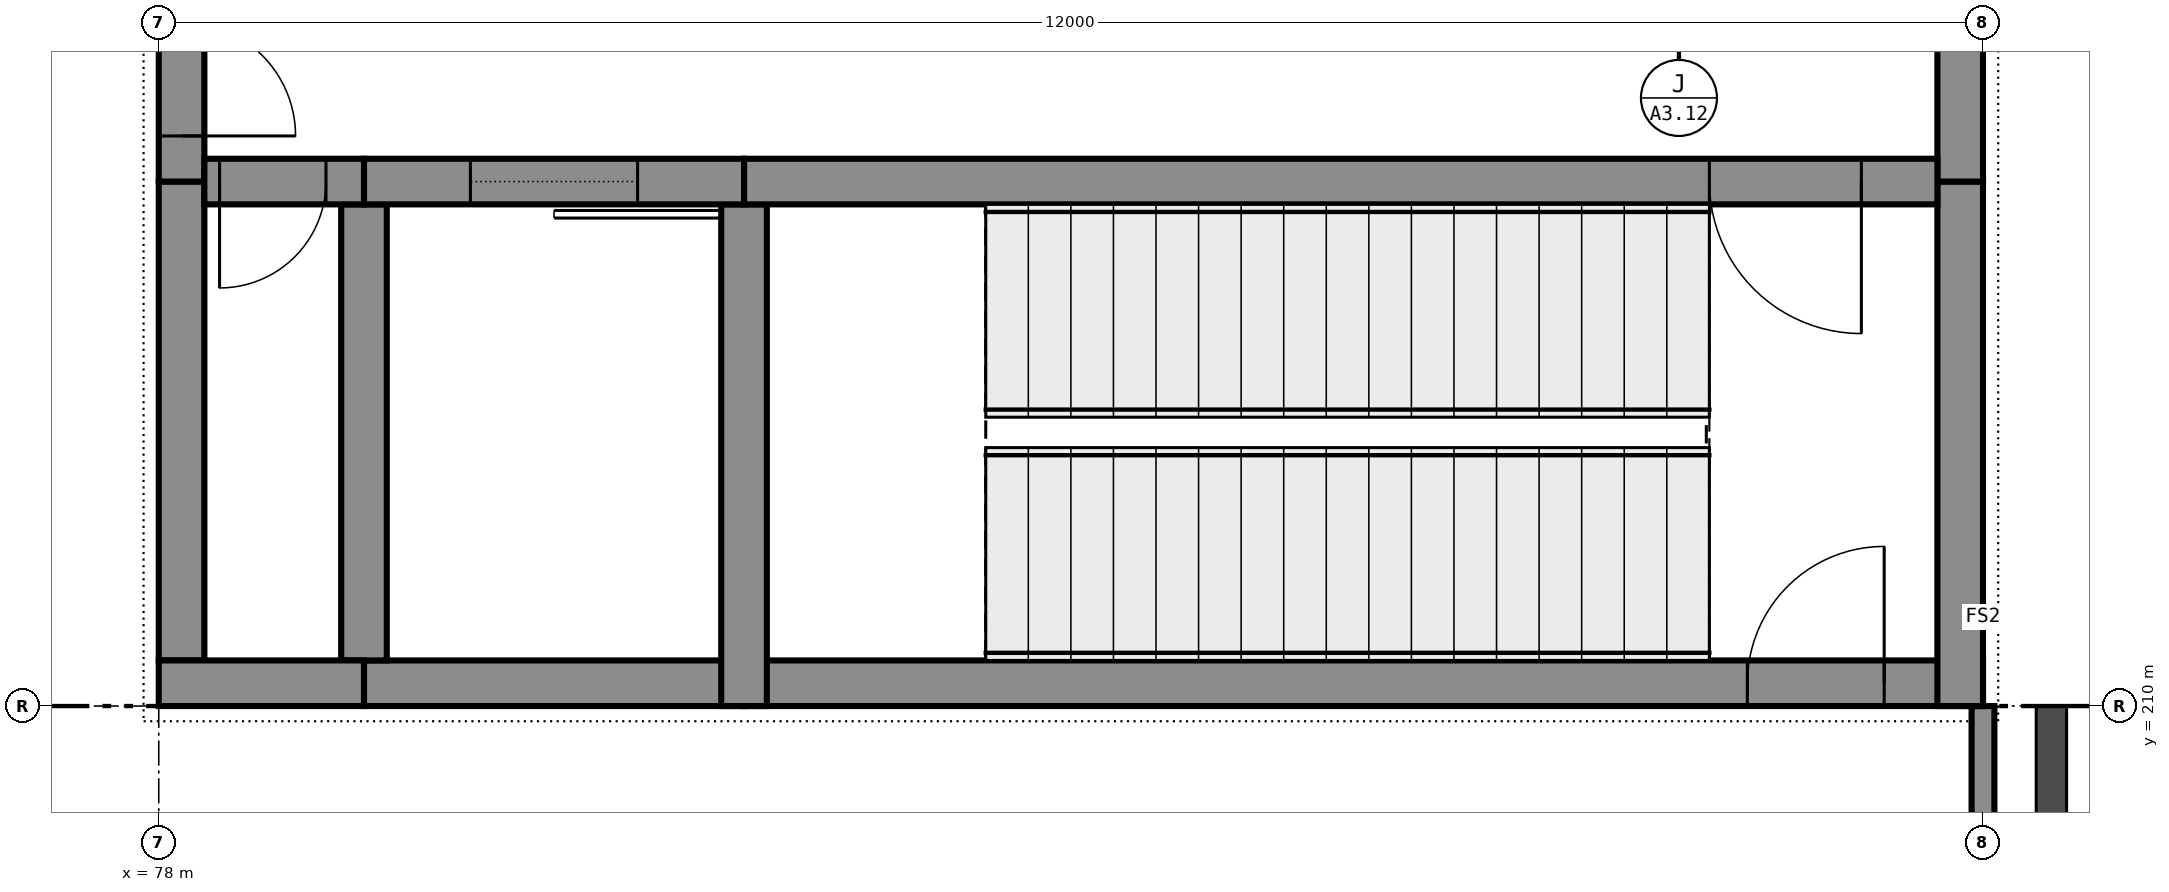
"""IFC4 building model, lengths in metres.
Left out: names, types, materials, properties, quantities, classifications, styles, units other than length and angle.
Written with IfcOpenShell. Run it as: python <this file> out.ifc"""

import sys

from ifc_helpers import new_model, si_unit, direction, frame, frame_2d, origin, place, context, subcontext, project, spatial, rectangle, extrude, element, fill, save


model = new_model("IFC4")
c1 = context("Model", 3, precision=1e-05, world=origin(), true_north=direction((0.0, 1.0)))
c2 = subcontext(c1, "Body", "Model", "MODEL_VIEW")
j1 = project(units=[si_unit("LENGTHUNIT", "METRE"), si_unit("PLANEANGLEUNIT", "RADIAN")], contexts=[c1])
p1 = place(None, origin())
s1 = spatial("IfcSite", under=j1, at=p1, CompositionType="ELEMENT")
p2 = place(p1, origin())
s2 = spatial("IfcBuilding", under=s1, at=p2, CompositionType="ELEMENT")
p3 = place(p2, frame((0.0, 0.0, 6.0)))
s3 = spatial("IfcBuildingStorey", under=s2, at=p3, CompositionType="ELEMENT", Elevation=6.0)
p4 = place(p3, frame((90.0, 210.15, 0.0), z_axis=(0.0, 0.0, 1.0), x_axis=(-1.0, 0.0, 0.0)))
e1 = element("IfcWall", 1, at=p4, inside=s3, PredefinedType="SHEAR", context=c2, shape_type="SweptSolid", body=[
    extrude(rectangle(XDim=8.15, YDim=0.3, at=frame_2d((4.075, 0.0))), origin(), (0.0, 0.0, 1.0), 5.75),
])
p5 = place(p4, frame((0.65, 0.0, 0.0)))
e2 = element("IfcOpeningElement", 2, at=p5, cuts=e1, PredefinedType="OPENING", context=c2, shape_type="SweptSolid", body=[
    extrude(rectangle(XDim=0.9, YDim=2.1, at=frame_2d((0.45, 1.05))), frame((0.0, 0.16, 0.0), z_axis=(0.0, -1.0, 0.0), x_axis=(1.0, 0.0, 0.0)), (0.0, 0.0, 1.0), 0.32),
])
p6 = place(p3, frame((81.85, 210.15, 0.0), z_axis=(0.0, 0.0, 1.0), x_axis=(-1.0, 0.0, 0.0)))
e3 = element("IfcWall", 3, at=p6, inside=s3, PredefinedType="SHEAR", context=c2, shape_type="SweptSolid", body=[
    extrude(rectangle(XDim=2.5, YDim=0.3, at=frame_2d((1.25, 0.0))), origin(), (0.0, 0.0, 1.0), 5.75),
])
p7 = place(p3, frame((79.35, 210.15, 0.0), z_axis=(0.0, 0.0, 1.0), x_axis=(-1.0, 0.0, 0.0)))
e4 = element("IfcWall", 4, at=p7, inside=s3, PredefinedType="SHEAR", context=c2, shape_type="SweptSolid", body=[
    extrude(rectangle(XDim=1.35, YDim=0.3, at=frame_2d((0.675, 0.0))), origin(), (0.0, 0.0, 1.0), 5.75),
])
p8 = place(p3, frame((89.7, 213.45, 0.0), z_axis=(0.0, 0.0, 1.0), x_axis=(-1.0, 0.0, 0.0)))
e5 = element("IfcWall", 5, at=p8, inside=s3, PredefinedType="SHEAR", context=c2, shape_type="SweptSolid", body=[
    extrude(rectangle(XDim=7.85, YDim=0.3, at=frame_2d((3.925, 0.0))), origin(), (0.0, 0.0, 1.0), 5.75),
])
p9 = place(p8, frame((0.5, 0.0, 0.0)))
e6 = element("IfcOpeningElement", 6, at=p9, cuts=e5, PredefinedType="OPENING", context=c2, shape_type="SweptSolid", body=[
    extrude(rectangle(XDim=1.0, YDim=2.1, at=frame_2d((0.5, 1.05))), frame((0.0, 0.16, 0.0), z_axis=(0.0, -1.0, 0.0), x_axis=(1.0, 0.0, 0.0)), (0.0, 0.0, 1.0), 0.32),
])
p10 = place(p3, frame((81.85, 213.45, 0.0), z_axis=(0.0, 0.0, 1.0), x_axis=(-1.0, 0.0, 0.0)))
e7 = element("IfcWall", 7, at=p10, inside=s3, PredefinedType="SHEAR", context=c2, shape_type="SweptSolid", body=[
    extrude(rectangle(XDim=2.5, YDim=0.3, at=frame_2d((1.25, 0.0))), origin(), (0.0, 0.0, 1.0), 5.75),
])
p11 = place(p10, frame((0.7, 0.0, 0.0)))
e8 = element("IfcOpeningElement", 8, at=p11, cuts=e7, PredefinedType="OPENING", context=c2, shape_type="SweptSolid", body=[
    extrude(rectangle(XDim=1.1, YDim=2.1, at=frame_2d((0.55, 1.05))), frame((0.0, 0.16, 0.0), z_axis=(0.0, -1.0, 0.0), x_axis=(1.0, 0.0, 0.0)), (0.0, 0.0, 1.0), 0.32),
])
p12 = place(p3, frame((79.35, 213.45, 0.0), z_axis=(0.0, 0.0, 1.0), x_axis=(-1.0, 0.0, 0.0)))
e9 = element("IfcWall", 9, at=p12, inside=s3, PredefinedType="SHEAR", context=c2, shape_type="SweptSolid", body=[
    extrude(rectangle(XDim=1.05, YDim=0.3, at=frame_2d((0.525, 0.0))), origin(), (0.0, 0.0, 1.0), 5.75),
])
p13 = place(p12, frame((0.25, 0.0, 0.0)))
e10 = element("IfcOpeningElement", 10, at=p13, cuts=e9, PredefinedType="OPENING", context=c2, shape_type="SweptSolid", body=[
    extrude(rectangle(XDim=0.7, YDim=2.1, at=frame_2d((0.35, 1.05))), frame((0.0, 0.16, 0.0), z_axis=(0.0, -1.0, 0.0), x_axis=(1.0, 0.0, 0.0)), (0.0, 0.0, 1.0), 0.32),
])
p14 = place(p3, frame((89.85, 210.0, 0.0), z_axis=(0.0, 0.0, 1.0), x_axis=(0.0, 1.0, 0.0)))
e11 = element("IfcWall", 11, at=p14, inside=s3, PredefinedType="SHEAR", context=c2, shape_type="SweptSolid", body=[
    extrude(rectangle(XDim=3.45, YDim=0.3, at=frame_2d((1.725, 0.0))), origin(), (0.0, 0.0, 1.0), 5.75),
])
p15 = place(p3, frame((89.85, 213.45, 0.0), z_axis=(0.0, 0.0, 1.0), x_axis=(0.0, 1.0, 0.0)))
e12 = element("IfcWall", 12, at=p15, inside=s3, PredefinedType="SHEAR", context=c2, shape_type="SweptSolid", body=[
    extrude(rectangle(XDim=5.1, YDim=0.3, at=frame_2d((2.55, 0.0))), origin(), (0.0, 0.0, 1.0), 5.75),
])
p16 = place(p3, frame((78.15, 210.3, 0.0), z_axis=(0.0, 0.0, 1.0), x_axis=(0.0, 1.0, 0.0)))
e13 = element("IfcWall", 13, at=p16, inside=s3, PredefinedType="SHEAR", context=c2, shape_type="SweptSolid", body=[
    extrude(rectangle(XDim=3.15, YDim=0.3, at=frame_2d((1.575, 0.0))), origin(), (0.0, 0.0, 1.0), 5.75),
])
p17 = place(p3, frame((78.15, 213.45, 0.0), z_axis=(0.0, 0.0, 1.0), x_axis=(0.0, 1.0, 0.0)))
e14 = element("IfcWall", 14, at=p17, inside=s3, PredefinedType="SHEAR", context=c2, shape_type="SweptSolid", body=[
    extrude(rectangle(XDim=5.1, YDim=0.3, at=frame_2d((2.55, 0.0))), origin(), (0.0, 0.0, 1.0), 5.75),
])
p18 = place(p17, frame((0.3, 0.0, 0.0)))
e15 = element("IfcOpeningElement", 15, at=p18, cuts=e14, PredefinedType="OPENING", context=c2, shape_type="SweptSolid", body=[
    extrude(rectangle(XDim=1.5, YDim=2.1, at=frame_2d((0.75, 1.05))), frame((0.0, 0.16, 0.0), z_axis=(0.0, -1.0, 0.0), x_axis=(1.0, 0.0, 0.0)), (0.0, 0.0, 1.0), 0.32),
])
p19 = place(p3, frame((81.85, 210.0, 0.0), z_axis=(0.0, 0.0, 1.0), x_axis=(0.0, 1.0, 0.0)))
e16 = element("IfcWall", 16, at=p19, inside=s3, PredefinedType="SHEAR", context=c2, shape_type="SweptSolid", body=[
    extrude(rectangle(XDim=3.3, YDim=0.3, at=frame_2d((1.65, 0.0))), origin(), (0.0, 0.0, 1.0), 5.75),
])
p20 = place(p3, frame((79.35, 210.3, 0.0), z_axis=(0.0, 0.0, 1.0), x_axis=(0.0, 1.0, 0.0)))
e17 = element("IfcWall", 17, at=p20, inside=s3, PredefinedType="SHEAR", context=c2, shape_type="SweptSolid", body=[
    extrude(rectangle(XDim=3.0, YDim=0.3, at=frame_2d((1.5, 0.0))), origin(), (0.0, 0.0, 1.0), 5.75),
])
p21 = place(p3, frame((90.0, 198.0, 0.0), z_axis=(0.0, 0.0, 1.0), x_axis=(0.0, 1.0, 0.0)))
e18 = element("IfcWall", 18, at=p21, inside=s3, PredefinedType="PARTITIONING", context=c2, shape_type="SweptSolid", body=[
    extrude(rectangle(XDim=12.0, YDim=0.15, at=frame_2d((6.0, 0.0))), origin(), (0.0, 0.0, 1.0), 4.75),
])
p22 = place(p5, frame((0.9, 0.0, 0.0), z_axis=(0.0, 0.0, 1.0), x_axis=(-1.0, 0.0, 0.0)))
e19 = element("IfcDoor", 19, at=p22, inside=s3, OperationType="SINGLE_SWING_LEFT", PredefinedType="DOOR", context=c2, shape_type="SweptSolid", body=[
    extrude(rectangle(XDim=0.9, YDim=2.1, at=frame_2d((0.45, 1.05))), frame((0.0, 0.025, 0.0), z_axis=(0.0, -1.0, 0.0), x_axis=(1.0, 0.0, 0.0)), (0.0, 0.0, 1.0), 0.05),
])
fill(e2, e19)
p23 = place(p13, origin())
e20 = element("IfcDoor", 20, at=p23, inside=s3, OperationType="SINGLE_SWING_LEFT", PredefinedType="DOOR", context=c2, shape_type="SweptSolid", body=[
    extrude(rectangle(XDim=0.7, YDim=2.1, at=frame_2d((0.35, 1.05))), frame((0.0, 0.025, 0.0), z_axis=(0.0, -1.0, 0.0), x_axis=(1.0, 0.0, 0.0)), (0.0, 0.0, 1.0), 0.05),
])
fill(e10, e20)
p24 = place(p11, origin())
e21 = element("IfcDoor", 21, at=p24, inside=s3, OperationType="SLIDING_TO_LEFT", PredefinedType="DOOR", context=c2, shape_type="SweptSolid", body=[
    extrude(rectangle(XDim=1.1, YDim=2.1, at=frame_2d((0.55, 1.05))), frame((0.0, 0.025, 0.0), z_axis=(0.0, -1.0, 0.0), x_axis=(1.0, 0.0, 0.0)), (0.0, 0.0, 1.0), 0.05),
])
fill(e8, e21)
p25 = place(p9, origin())
e22 = element("IfcDoor", 22, at=p25, inside=s3, OperationType="SINGLE_SWING_RIGHT", PredefinedType="DOOR", context=c2, shape_type="SweptSolid", body=[
    extrude(rectangle(XDim=1.0, YDim=2.1, at=frame_2d((0.5, 1.05))), frame((0.0, 0.025, 0.0), z_axis=(0.0, -1.0, 0.0), x_axis=(1.0, 0.0, 0.0)), (0.0, 0.0, 1.0), 0.05),
])
fill(e6, e22)
p26 = place(p18, frame((1.5, 0.0, 0.0), z_axis=(0.0, 0.0, 1.0), x_axis=(-1.0, 0.0, 0.0)))
e23 = element("IfcDoor", 23, at=p26, inside=s3, OperationType="DOUBLE_DOOR_SINGLE_SWING", PredefinedType="DOOR", context=c2, shape_type="SweptSolid", body=[
    extrude(rectangle(XDim=1.5, YDim=2.1, at=frame_2d((0.75, 1.05))), frame((0.0, 0.025, 0.0), z_axis=(0.0, -1.0, 0.0), x_axis=(1.0, 0.0, 0.0)), (0.0, 0.0, 1.0), 0.05),
])
fill(e15, e23)
save(model, sys.argv[1])
